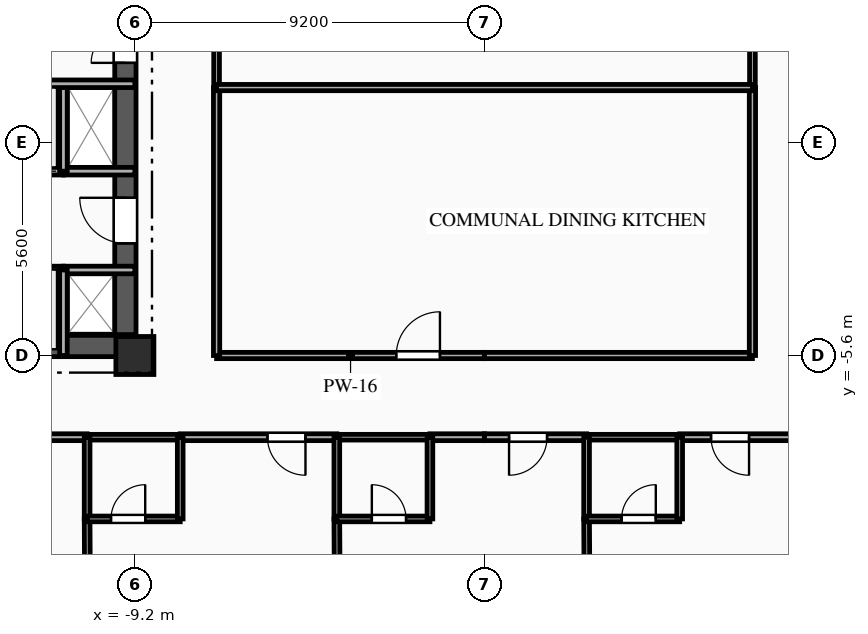
"""IFC4 building model, lengths in metres.
Left out: names, types, materials, properties, quantities, classifications, styles, units other than length and angle.
Written with IfcOpenShell. Run it as: python <this file> out.ifc"""

import sys

from ifc_helpers import new_model, si_unit, direction, frame, frame_2d, origin, origin_2d, place, context, subcontext, project, spatial, rectangle, extrude, element, fill, save


model = new_model("IFC4")
c1 = context("Model", 3, precision=1e-05, world=origin(), true_north=direction((0.0, 1.0)))
c2 = subcontext(c1, "Body", "Model", "MODEL_VIEW")
j1 = project(units=[si_unit("LENGTHUNIT", "METRE"), si_unit("PLANEANGLEUNIT", "RADIAN")], contexts=[c1])
p1 = place(None, origin())
s1 = spatial("IfcSite", under=j1, at=p1, CompositionType="ELEMENT")
p2 = place(p1, origin())
s2 = spatial("IfcBuilding", under=s1, at=p2, CompositionType="ELEMENT")
p3 = place(p2, frame((0.0, 0.0, 115.85)))
s3 = spatial("IfcBuildingStorey", under=s2, at=p3, CompositionType="ELEMENT", Elevation=115.85)
p4 = place(p3, frame((-9.2, -5.6, 0.0), z_axis=(0.0, 0.0, 1.0), x_axis=(1.0, 0.0, 0.0)))
e1 = element("IfcColumn", 1, at=p4, inside=s3, PredefinedType="COLUMN", context=c2, shape_type="SweptSolid", body=[
    extrude(rectangle(XDim=1.0, YDim=1.0, at=origin_2d()), origin(), (0.0, 0.0, 1.0), 3.35),
])
p5 = place(p3, frame((-18.8, -5.35, 0.0), z_axis=(0.0, 0.0, 1.0), x_axis=(1.0, 0.0, 0.0)))
e2 = element("IfcWall", 2, at=p5, inside=s3, PredefinedType="SHEAR", context=c2, shape_type="SweptSolid", body=[
    extrude(rectangle(XDim=9.6, YDim=0.56, at=frame_2d((4.8, 0.0))), origin(), (0.0, 0.0, 1.0), 3.045),
])
p6 = place(p5, frame((1.05, 0.0, 0.0)))
e3 = element("IfcOpeningElement", 3, at=p6, cuts=e2, PredefinedType="OPENING", context=c2, shape_type="SweptSolid", body=[
    extrude(rectangle(XDim=0.9, YDim=2.1, at=frame_2d((0.45, 1.05))), frame((0.0, 0.29, 0.0), z_axis=(0.0, -1.0, 0.0), x_axis=(1.0, 0.0, 0.0)), (0.0, 0.0, 1.0), 0.58),
])
p7 = place(p3, frame((-9.45, -5.05, 0.0), z_axis=(0.0, 0.0, 1.0), x_axis=(0.0, 1.0, 0.0)))
e4 = element("IfcWall", 4, at=p7, inside=s3, PredefinedType="SHEAR", context=c2, shape_type="SweptSolid", body=[
    extrude(rectangle(XDim=10.1, YDim=0.56, at=frame_2d((5.05, 0.0))), origin(), (0.0, 0.0, 1.0), 3.045),
])
p8 = place(p7, frame((7.15, 0.0, 0.0)))
e5 = element("IfcOpeningElement", 5, at=p8, cuts=e4, PredefinedType="OPENING", context=c2, shape_type="SweptSolid", body=[
    extrude(rectangle(XDim=0.9, YDim=2.1, at=frame_2d((0.45, 1.05))), frame((0.0, 0.29, 0.0), z_axis=(0.0, -1.0, 0.0), x_axis=(1.0, 0.0, 0.0)), (0.0, 0.0, 1.0), 0.58),
])
p9 = place(p7, frame((2.4, 0.0, 0.0)))
e6 = element("IfcOpeningElement", 6, at=p9, cuts=e4, PredefinedType="OPENING", context=c2, shape_type="SweptSolid", body=[
    extrude(rectangle(XDim=1.2, YDim=2.15, at=frame_2d((0.6, 1.075))), frame((0.0, 0.29, 0.0), z_axis=(0.0, -1.0, 0.0), x_axis=(1.0, 0.0, 0.0)), (0.0, 0.0, 1.0), 0.58),
])
p10 = place(p3, frame((-13.02, -3.35, 0.0), z_axis=(0.0, 0.0, 1.0), x_axis=(1.0, 0.0, 0.0)))
e7 = element("IfcWall", 7, at=p10, inside=s3, PredefinedType="PARTITIONING", context=c2, shape_type="SweptSolid", body=[
    extrude(rectangle(XDim=1.94, YDim=0.2, at=frame_2d((0.97, 0.0))), origin(), (0.0, 0.0, 1.0), 3.045),
])
p11 = place(p10, frame((0.445, 0.0, 0.0)))
e8 = element("IfcOpeningElement", 8, at=p11, cuts=e7, PredefinedType="OPENING", context=c2, shape_type="SweptSolid", body=[
    extrude(rectangle(XDim=1.05, YDim=2.1, at=frame_2d((0.525, 1.05))), frame((0.0, 0.11, 0.0), z_axis=(0.0, -1.0, 0.0), x_axis=(1.0, 0.0, 0.0)), (0.0, 0.0, 1.0), 0.22),
])
p12 = place(p3, frame((-11.08, -3.35, 0.0), z_axis=(0.0, 0.0, 1.0), x_axis=(1.0, 0.0, 0.0)))
e9 = element("IfcWall", 9, at=p12, inside=s3, PredefinedType="PARTITIONING", context=c2, shape_type="SweptSolid", body=[
    extrude(rectangle(XDim=1.88, YDim=0.2, at=frame_2d((0.94, 0.0))), origin(), (0.0, 0.0, 1.0), 2.76),
])
p13 = place(p3, frame((-11.08, -0.75, 0.0), z_axis=(0.0, 0.0, 1.0), x_axis=(-1.0, 0.0, 0.0)))
e10 = element("IfcWall", 10, at=p13, inside=s3, PredefinedType="PARTITIONING", context=c2, shape_type="SweptSolid", body=[
    extrude(rectangle(XDim=1.94, YDim=0.2, at=frame_2d((0.97, 0.0))), origin(), (0.0, 0.0, 1.0), 3.045),
])
p14 = place(p13, frame((0.445, 0.0, 0.0)))
e11 = element("IfcOpeningElement", 11, at=p14, cuts=e10, PredefinedType="OPENING", context=c2, shape_type="SweptSolid", body=[
    extrude(rectangle(XDim=1.05, YDim=2.1, at=frame_2d((0.525, 1.05))), frame((0.0, 0.11, 0.0), z_axis=(0.0, -1.0, 0.0), x_axis=(1.0, 0.0, 0.0)), (0.0, 0.0, 1.0), 0.22),
])
p15 = place(p3, frame((-9.2, -0.75, 0.0), z_axis=(0.0, 0.0, 1.0), x_axis=(-1.0, 0.0, 0.0)))
e12 = element("IfcWall", 12, at=p15, inside=s3, PredefinedType="PARTITIONING", context=c2, shape_type="SweptSolid", body=[
    extrude(rectangle(XDim=1.88, YDim=0.2, at=frame_2d((0.94, 0.0))), origin(), (0.0, 0.0, 1.0), 3.045),
])
p16 = place(p3, frame((-11.08, -5.6, 0.0), z_axis=(0.0, 0.0, 1.0), x_axis=(0.0, 1.0, 0.0)))
e13 = element("IfcWall", 13, at=p16, inside=s3, PredefinedType="PARTITIONING", context=c2, shape_type="SweptSolid", body=[
    extrude(rectangle(XDim=2.25, YDim=0.2, at=frame_2d((1.125, 0.0))), origin(), (0.0, 0.0, 1.0), 3.045),
])
p17 = place(p3, frame((-11.08, -0.75, 0.0), z_axis=(0.0, 0.0, 1.0), x_axis=(0.0, 1.0, 0.0)))
e14 = element("IfcWall", 14, at=p17, inside=s3, PredefinedType="PARTITIONING", context=c2, shape_type="SweptSolid", body=[
    extrude(rectangle(XDim=2.3, YDim=0.2, at=frame_2d((1.15, 0.0))), origin(), (0.0, 0.0, 1.0), 3.045),
])
p18 = place(p3, frame((-10.457, -7.75, 0.0), z_axis=(0.0, 0.0, 1.0), x_axis=(-1.0, 0.0, 0.0)))
e15 = element("IfcWall", 15, at=p18, inside=s3, PredefinedType="PARTITIONING", context=c2, shape_type="SweptSolid", body=[
    extrude(rectangle(XDim=4.122, YDim=0.18, at=frame_2d((2.061, 0.0))), origin(), (0.0, 0.0, 1.0), 3.045),
])
p19 = place(p18, frame((2.297, 0.0, 0.0)))
e16 = element("IfcOpeningElement", 16, at=p19, cuts=e15, PredefinedType="OPENING", context=c2, shape_type="SweptSolid", body=[
    extrude(rectangle(XDim=1.0, YDim=2.15, at=frame_2d((0.5, 1.075))), frame((0.0, 0.1, 0.0), z_axis=(0.0, -1.0, 0.0), x_axis=(1.0, 0.0, 0.0)), (0.0, 0.0, 1.0), 0.2),
])
p20 = place(p3, frame((-3.886, -7.75, 0.0), z_axis=(0.0, 0.0, 1.0), x_axis=(-1.0, 0.0, 0.0)))
e17 = element("IfcWall", 17, at=p20, inside=s3, PredefinedType="PARTITIONING", context=c2, shape_type="SweptSolid", body=[
    extrude(rectangle(XDim=4.121, YDim=0.18, at=frame_2d((2.061, 0.0))), origin(), (0.0, 0.0, 1.0), 3.045),
])
p21 = place(p20, frame((0.825, 0.0, 0.0)))
e18 = element("IfcOpeningElement", 18, at=p21, cuts=e17, PredefinedType="OPENING", context=c2, shape_type="SweptSolid", body=[
    extrude(rectangle(XDim=1.0, YDim=2.15, at=frame_2d((0.5, 1.075))), frame((0.0, 0.1, 0.0), z_axis=(0.0, -1.0, 0.0), x_axis=(1.0, 0.0, 0.0)), (0.0, 0.0, 1.0), 0.2),
])
p22 = place(p3, frame((-8.007, -7.75, 0.0), z_axis=(0.0, 0.0, 1.0), x_axis=(-1.0, 0.0, 0.0)))
e19 = element("IfcWall", 19, at=p22, inside=s3, PredefinedType="PLUMBINGWALL", context=c2, shape_type="SweptSolid", body=[
    extrude(rectangle(XDim=2.45, YDim=0.15, at=frame_2d((1.225, 0.0))), origin(), (0.0, 0.0, 1.0), 3.045),
])
p23 = place(p3, frame((0.0, -7.75, 0.0), z_axis=(0.0, 0.0, 1.0), x_axis=(-1.0, 0.0, 0.0)))
e20 = element("IfcWall", 20, at=p23, inside=s3, PredefinedType="PARTITIONING", context=c2, shape_type="SweptSolid", body=[
    extrude(rectangle(XDim=1.436, YDim=0.18, at=frame_2d((0.718, 0.0))), origin(), (0.0, 0.0, 1.0), 3.045),
])
p24 = place(p3, frame((-1.436, -7.75, 0.0), z_axis=(0.0, 0.0, 1.0), x_axis=(-1.0, 0.0, 0.0)))
e21 = element("IfcWall", 21, at=p24, inside=s3, PredefinedType="PLUMBINGWALL", context=c2, shape_type="SweptSolid", body=[
    extrude(rectangle(XDim=2.45, YDim=0.15, at=frame_2d((1.225, 0.0))), origin(), (0.0, 0.0, 1.0), 3.045),
])
p25 = place(p3, frame((-7.05, -5.6, 0.0), z_axis=(0.0, 0.0, 1.0), x_axis=(1.0, 0.0, 0.0)))
e22 = element("IfcWall", 22, at=p25, inside=s3, PredefinedType="PARTITIONING", context=c2, shape_type="SweptSolid", body=[
    extrude(rectangle(XDim=7.05, YDim=0.165, at=frame_2d((3.525, 0.0))), origin(), (0.0, 0.0, 1.0), 2.53),
])
p26 = place(p25, frame((4.728, 0.0, 0.0)))
e23 = element("IfcOpeningElement", 23, at=p26, cuts=e22, PredefinedType="OPENING", context=c2, shape_type="SweptSolid", body=[
    extrude(rectangle(XDim=1.15, YDim=2.15, at=frame_2d((0.575, 1.075))), frame((0.0, 0.093, 0.0), z_axis=(0.0, -1.0, 0.0), x_axis=(1.0, 0.0, 0.0)), (0.0, 0.0, 1.0), 0.185),
])
p27 = place(p3, frame((2.686, -7.75, 0.0), z_axis=(0.0, 0.0, 1.0), x_axis=(-1.0, 0.0, 0.0)))
e24 = element("IfcWall", 24, at=p27, inside=s3, PredefinedType="PARTITIONING", context=c2, shape_type="SweptSolid", body=[
    extrude(rectangle(XDim=2.686, YDim=0.18, at=frame_2d((1.343, 0.0))), origin(), (0.0, 0.0, 1.0), 3.045),
])
p28 = place(p27, frame((1.04, 0.0, 0.0)))
e25 = element("IfcOpeningElement", 25, at=p28, cuts=e24, PredefinedType="OPENING", context=c2, shape_type="SweptSolid", body=[
    extrude(rectangle(XDim=1.0, YDim=2.15, at=frame_2d((0.5, 1.075))), frame((0.0, 0.1, 0.0), z_axis=(0.0, -1.0, 0.0), x_axis=(1.0, 0.0, 0.0)), (0.0, 0.0, 1.0), 0.2),
])
p29 = place(p3, frame((9.257, -7.75, 0.0), z_axis=(0.0, 0.0, 1.0), x_axis=(-1.0, 0.0, 0.0)))
e26 = element("IfcWall", 26, at=p29, inside=s3, PredefinedType="PARTITIONING", context=c2, shape_type="SweptSolid", body=[
    extrude(rectangle(XDim=4.121, YDim=0.18, at=frame_2d((2.061, 0.0))), origin(), (0.0, 0.0, 1.0), 3.045),
])
p30 = place(p29, frame((2.296, 0.0, 0.0)))
e27 = element("IfcOpeningElement", 27, at=p30, cuts=e26, PredefinedType="OPENING", context=c2, shape_type="SweptSolid", body=[
    extrude(rectangle(XDim=1.0, YDim=2.15, at=frame_2d((0.5, 1.075))), frame((0.0, 0.1, 0.0), z_axis=(0.0, -1.0, 0.0), x_axis=(1.0, 0.0, 0.0)), (0.0, 0.0, 1.0), 0.2),
])
p31 = place(p3, frame((5.136, -7.75, 0.0), z_axis=(0.0, 0.0, 1.0), x_axis=(-1.0, 0.0, 0.0)))
e28 = element("IfcWall", 28, at=p31, inside=s3, PredefinedType="PLUMBINGWALL", context=c2, shape_type="SweptSolid", body=[
    extrude(rectangle(XDim=2.45, YDim=0.15, at=frame_2d((1.225, 0.0))), origin(), (0.0, 0.0, 1.0), 3.045),
])
p32 = place(p3, frame((0.0, -5.6, 0.0), z_axis=(0.0, 0.0, 1.0), x_axis=(1.0, 0.0, 0.0)))
e29 = element("IfcWall", 29, at=p32, inside=s3, PredefinedType="PARTITIONING", context=c2, shape_type="SweptSolid", body=[
    extrude(rectangle(XDim=7.05, YDim=0.165, at=frame_2d((3.525, 0.0))), origin(), (0.0, 0.0, 1.0), 2.53),
])
p33 = place(p3, frame((-7.05, 1.45, 0.0), z_axis=(0.0, 0.0, 1.0), x_axis=(0.0, -1.0, 0.0)))
e30 = element("IfcWall", 30, at=p33, inside=s3, PredefinedType="PARTITIONING", context=c2, shape_type="SweptSolid", body=[
    extrude(rectangle(XDim=7.05, YDim=0.165, at=frame_2d((3.525, 0.0))), origin(), (0.0, 0.0, 1.0), 3.045),
])
p34 = place(p3, frame((-7.05, 8.5, 0.0), z_axis=(0.0, 0.0, 1.0), x_axis=(0.0, -1.0, 0.0)))
e31 = element("IfcWall", 31, at=p34, inside=s3, PredefinedType="PARTITIONING", context=c2, shape_type="SweptSolid", body=[
    extrude(rectangle(XDim=7.05, YDim=0.15, at=frame_2d((3.525, 0.0))), origin(), (0.0, 0.0, 1.0), 3.045),
])
p35 = place(p3, frame((7.05, -5.6, 0.0), z_axis=(0.0, 0.0, 1.0), x_axis=(0.0, 1.0, 0.0)))
e32 = element("IfcWall", 32, at=p35, inside=s3, PredefinedType="PARTITIONING", context=c2, shape_type="SweptSolid", body=[
    extrude(rectangle(XDim=7.05, YDim=0.165, at=frame_2d((3.525, 0.0))), origin(), (0.0, 0.0, 1.0), 3.045),
])
p36 = place(p3, frame((7.05, 1.45, 0.0), z_axis=(0.0, 0.0, 1.0), x_axis=(0.0, 1.0, 0.0)))
e33 = element("IfcWall", 33, at=p36, inside=s3, PredefinedType="PARTITIONING", context=c2, shape_type="SweptSolid", body=[
    extrude(rectangle(XDim=7.05, YDim=0.15, at=frame_2d((3.525, 0.0))), origin(), (0.0, 0.0, 1.0), 3.045),
])
p37 = place(p3, frame((-10.457, -9.9, 0.0), z_axis=(0.0, 0.0, 1.0), x_axis=(0.005252948012, -0.999986203173, 0.0)))
e34 = element("IfcWall", 34, at=p37, inside=s3, PredefinedType="PARTITIONING", context=c2, shape_type="SweptSolid", body=[
    extrude(rectangle(XDim=8.366, YDim=0.15, at=frame_2d((4.183, 0.0))), origin(), (0.0, 0.0, 1.0), 3.045),
])
p38 = place(p3, frame((-10.457, -7.75, 0.0), z_axis=(0.0, 0.0, 1.0), x_axis=(0.0, -1.0, 0.0)))
e35 = element("IfcWall", 35, at=p38, inside=s3, PredefinedType="PLUMBINGWALL", context=c2, shape_type="SweptSolid", body=[
    extrude(rectangle(XDim=2.15, YDim=0.15, at=frame_2d((1.075, 0.0))), origin(), (0.0, 0.0, 1.0), 3.045),
])
p39 = place(p3, frame((-10.457, -9.9, 0.0), z_axis=(0.0, 0.0, 1.0), x_axis=(1.0, 0.0, 0.0)))
e36 = element("IfcWall", 36, at=p39, inside=s3, PredefinedType="PLUMBINGWALL", context=c2, shape_type="SweptSolid", body=[
    extrude(rectangle(XDim=2.45, YDim=0.15, at=frame_2d((1.225, 0.0))), origin(), (0.0, 0.0, 1.0), 3.045),
])
p40 = place(p39, frame((0.629, 0.0, 0.0)))
e37 = element("IfcOpeningElement", 37, at=p40, cuts=e36, PredefinedType="OPENING", context=c2, shape_type="SweptSolid", body=[
    extrude(rectangle(XDim=0.9, YDim=2.1, at=frame_2d((0.45, 1.05))), frame((0.0, 0.085, 0.0), z_axis=(0.0, -1.0, 0.0), x_axis=(1.0, 0.0, 0.0)), (0.0, 0.0, 1.0), 0.17),
])
p41 = place(p3, frame((-8.007, -9.9, 0.0), z_axis=(0.0, 0.0, 1.0), x_axis=(0.0, 1.0, 0.0)))
e38 = element("IfcWall", 38, at=p41, inside=s3, PredefinedType="PLUMBINGWALL", context=c2, shape_type="SweptSolid", body=[
    extrude(rectangle(XDim=2.15, YDim=0.15, at=frame_2d((1.075, 0.0))), origin(), (0.0, 0.0, 1.0), 3.045),
])
p42 = place(p3, frame((-3.886, -9.9, 0.0), z_axis=(0.0, 0.0, 1.0), x_axis=(0.005725643334, -0.99998360837, 0.0)))
e39 = element("IfcWall", 39, at=p42, inside=s3, PredefinedType="PARTITIONING", context=c2, shape_type="SweptSolid", body=[
    extrude(rectangle(XDim=7.675, YDim=0.15, at=frame_2d((3.838, 0.0))), origin(), (0.0, 0.0, 1.0), 3.045),
])
p43 = place(p3, frame((-3.886, -7.75, 0.0), z_axis=(0.0, 0.0, 1.0), x_axis=(0.0, -1.0, 0.0)))
e40 = element("IfcWall", 40, at=p43, inside=s3, PredefinedType="PLUMBINGWALL", context=c2, shape_type="SweptSolid", body=[
    extrude(rectangle(XDim=2.15, YDim=0.15, at=frame_2d((1.075, 0.0))), origin(), (0.0, 0.0, 1.0), 3.045),
])
p44 = place(p3, frame((-3.886, -9.9, 0.0), z_axis=(0.0, 0.0, 1.0), x_axis=(1.0, 0.0, 0.0)))
e41 = element("IfcWall", 41, at=p44, inside=s3, PredefinedType="PLUMBINGWALL", context=c2, shape_type="SweptSolid", body=[
    extrude(rectangle(XDim=2.45, YDim=0.15, at=frame_2d((1.225, 0.0))), origin(), (0.0, 0.0, 1.0), 3.045),
])
p45 = place(p44, frame((0.921, 0.0, 0.0)))
e42 = element("IfcOpeningElement", 42, at=p45, cuts=e41, PredefinedType="OPENING", context=c2, shape_type="SweptSolid", body=[
    extrude(rectangle(XDim=0.9, YDim=2.1, at=frame_2d((0.45, 1.05))), frame((0.0, 0.085, 0.0), z_axis=(0.0, -1.0, 0.0), x_axis=(1.0, 0.0, 0.0)), (0.0, 0.0, 1.0), 0.17),
])
p46 = place(p3, frame((-1.436, -9.9, 0.0), z_axis=(0.0, 0.0, 1.0), x_axis=(0.0, 1.0, 0.0)))
e43 = element("IfcWall", 43, at=p46, inside=s3, PredefinedType="PLUMBINGWALL", context=c2, shape_type="SweptSolid", body=[
    extrude(rectangle(XDim=2.15, YDim=0.15, at=frame_2d((1.075, 0.0))), origin(), (0.0, 0.0, 1.0), 3.045),
])
p47 = place(p3, frame((2.686, -9.9, 0.0), z_axis=(0.0, 0.0, 1.0), x_axis=(0.006291821768, -0.999980206294, 0.0)))
e44 = element("IfcWall", 44, at=p47, inside=s3, PredefinedType="PARTITIONING", context=c2, shape_type="SweptSolid", body=[
    extrude(rectangle(XDim=6.985, YDim=0.15, at=frame_2d((3.492, 0.0))), origin(), (0.0, 0.0, 1.0), 3.045),
])
p48 = place(p3, frame((2.686, -7.75, 0.0), z_axis=(0.0, 0.0, 1.0), x_axis=(0.0, -1.0, 0.0)))
e45 = element("IfcWall", 45, at=p48, inside=s3, PredefinedType="PLUMBINGWALL", context=c2, shape_type="SweptSolid", body=[
    extrude(rectangle(XDim=2.15, YDim=0.15, at=frame_2d((1.075, 0.0))), origin(), (0.0, 0.0, 1.0), 3.045),
])
p49 = place(p3, frame((2.686, -9.9, 0.0), z_axis=(0.0, 0.0, 1.0), x_axis=(1.0, 0.0, 0.0)))
e46 = element("IfcWall", 46, at=p49, inside=s3, PredefinedType="PLUMBINGWALL", context=c2, shape_type="SweptSolid", body=[
    extrude(rectangle(XDim=2.45, YDim=0.15, at=frame_2d((1.225, 0.0))), origin(), (0.0, 0.0, 1.0), 3.045),
])
p50 = place(p49, frame((0.921, 0.0, 0.0)))
e47 = element("IfcOpeningElement", 47, at=p50, cuts=e46, PredefinedType="OPENING", context=c2, shape_type="SweptSolid", body=[
    extrude(rectangle(XDim=0.9, YDim=2.1, at=frame_2d((0.45, 1.05))), frame((0.0, 0.085, 0.0), z_axis=(0.0, -1.0, 0.0), x_axis=(1.0, 0.0, 0.0)), (0.0, 0.0, 1.0), 0.17),
])
p51 = place(p3, frame((5.136, -9.9, 0.0), z_axis=(0.0, 0.0, 1.0), x_axis=(0.0, 1.0, 0.0)))
e48 = element("IfcWall", 48, at=p51, inside=s3, PredefinedType="PLUMBINGWALL", context=c2, shape_type="SweptSolid", body=[
    extrude(rectangle(XDim=2.15, YDim=0.15, at=frame_2d((1.075, 0.0))), origin(), (0.0, 0.0, 1.0), 3.045),
])
p52 = place(p3, frame((-7.05, 1.45, 0.0), z_axis=(0.0, 0.0, 1.0), x_axis=(1.0, 0.0, 0.0)))
e49 = element("IfcWall", 49, at=p52, inside=s3, PredefinedType="PARTITIONING", context=c2, shape_type="SweptSolid", body=[
    extrude(rectangle(XDim=14.1, YDim=0.165, at=frame_2d((7.05, 0.0))), origin(), (0.0, 0.0, 1.0), 3.045),
])
p53 = place(p3, frame((-15.05, 1.55, 0.0), z_axis=(0.0, 0.0, 1.0), x_axis=(1.0, 0.0, 0.0)))
e50 = element("IfcWall", 50, at=p53, inside=s3, PredefinedType="PARTITIONING", context=c2, shape_type="SweptSolid", body=[
    extrude(rectangle(XDim=5.85, YDim=0.2, at=frame_2d((2.925, 0.0))), origin(), (0.0, 0.0, 1.0), 3.045),
])
p54 = place(p8, origin())
e51 = element("IfcDoor", 51, at=p54, inside=s3, OperationType="SINGLE_SWING_LEFT", PredefinedType="DOOR", context=c2, shape_type="SweptSolid", body=[
    extrude(rectangle(XDim=0.9, YDim=2.1, at=frame_2d((0.45, 1.05))), frame((0.0, 0.025, 0.0), z_axis=(0.0, -1.0, 0.0), x_axis=(1.0, 0.0, 0.0)), (0.0, 0.0, 1.0), 0.05),
])
fill(e5, e51)
p55 = place(p9, origin())
e52 = element("IfcDoor", 52, at=p55, inside=s3, OperationType="SINGLE_SWING_RIGHT", PredefinedType="DOOR", context=c2, shape_type="SweptSolid", body=[
    extrude(rectangle(XDim=1.2, YDim=2.15, at=frame_2d((0.6, 1.075))), frame((0.0, 0.025, 0.0), z_axis=(0.0, -1.0, 0.0), x_axis=(1.0, 0.0, 0.0)), (0.0, 0.0, 1.0), 0.05),
])
fill(e6, e52)
p56 = place(p21, origin())
e53 = element("IfcDoor", 53, at=p56, inside=s3, OperationType="SINGLE_SWING_LEFT", PredefinedType="DOOR", context=c2, shape_type="SweptSolid", body=[
    extrude(rectangle(XDim=1.0, YDim=2.15, at=frame_2d((0.5, 1.075))), frame((0.0, 0.025, 0.0), z_axis=(0.0, -1.0, 0.0), x_axis=(1.0, 0.0, 0.0)), (0.0, 0.0, 1.0), 0.05),
])
fill(e18, e53)
p57 = place(p26, origin())
e54 = element("IfcDoor", 54, at=p57, inside=s3, OperationType="SINGLE_SWING_RIGHT", PredefinedType="DOOR", context=c2, shape_type="SweptSolid", body=[
    extrude(rectangle(XDim=1.15, YDim=2.15, at=frame_2d((0.575, 1.075))), frame((0.0, 0.025, 0.0), z_axis=(0.0, -1.0, 0.0), x_axis=(1.0, 0.0, 0.0)), (0.0, 0.0, 1.0), 0.05),
])
fill(e23, e54)
p58 = place(p28, origin())
e55 = element("IfcDoor", 55, at=p58, inside=s3, OperationType="SINGLE_SWING_RIGHT", PredefinedType="DOOR", context=c2, shape_type="SweptSolid", body=[
    extrude(rectangle(XDim=1.0, YDim=2.15, at=frame_2d((0.5, 1.075))), frame((0.0, 0.025, 0.0), z_axis=(0.0, -1.0, 0.0), x_axis=(1.0, 0.0, 0.0)), (0.0, 0.0, 1.0), 0.05),
])
fill(e25, e55)
p59 = place(p30, origin())
e56 = element("IfcDoor", 56, at=p59, inside=s3, OperationType="SINGLE_SWING_LEFT", PredefinedType="DOOR", context=c2, shape_type="SweptSolid", body=[
    extrude(rectangle(XDim=1.0, YDim=2.15, at=frame_2d((0.5, 1.075))), frame((0.0, 0.025, 0.0), z_axis=(0.0, -1.0, 0.0), x_axis=(1.0, 0.0, 0.0)), (0.0, 0.0, 1.0), 0.05),
])
fill(e27, e56)
p60 = place(p40, origin())
e57 = element("IfcDoor", 57, at=p60, inside=s3, OperationType="SINGLE_SWING_RIGHT", PredefinedType="DOOR", context=c2, shape_type="SweptSolid", body=[
    extrude(rectangle(XDim=0.9, YDim=2.1, at=frame_2d((0.45, 1.05))), frame((0.0, 0.025, 0.0), z_axis=(0.0, -1.0, 0.0), x_axis=(1.0, 0.0, 0.0)), (0.0, 0.0, 1.0), 0.05),
])
fill(e37, e57)
p61 = place(p45, origin())
e58 = element("IfcDoor", 58, at=p61, inside=s3, OperationType="SINGLE_SWING_LEFT", PredefinedType="DOOR", context=c2, shape_type="SweptSolid", body=[
    extrude(rectangle(XDim=0.9, YDim=2.1, at=frame_2d((0.45, 1.05))), frame((0.0, 0.025, 0.0), z_axis=(0.0, -1.0, 0.0), x_axis=(1.0, 0.0, 0.0)), (0.0, 0.0, 1.0), 0.05),
])
fill(e42, e58)
p62 = place(p50, origin())
e59 = element("IfcDoor", 59, at=p62, inside=s3, OperationType="SINGLE_SWING_RIGHT", PredefinedType="DOOR", context=c2, shape_type="SweptSolid", body=[
    extrude(rectangle(XDim=0.9, YDim=2.1, at=frame_2d((0.45, 1.05))), frame((0.0, 0.025, 0.0), z_axis=(0.0, -1.0, 0.0), x_axis=(1.0, 0.0, 0.0)), (0.0, 0.0, 1.0), 0.05),
])
fill(e47, e59)
save(model, sys.argv[1])
